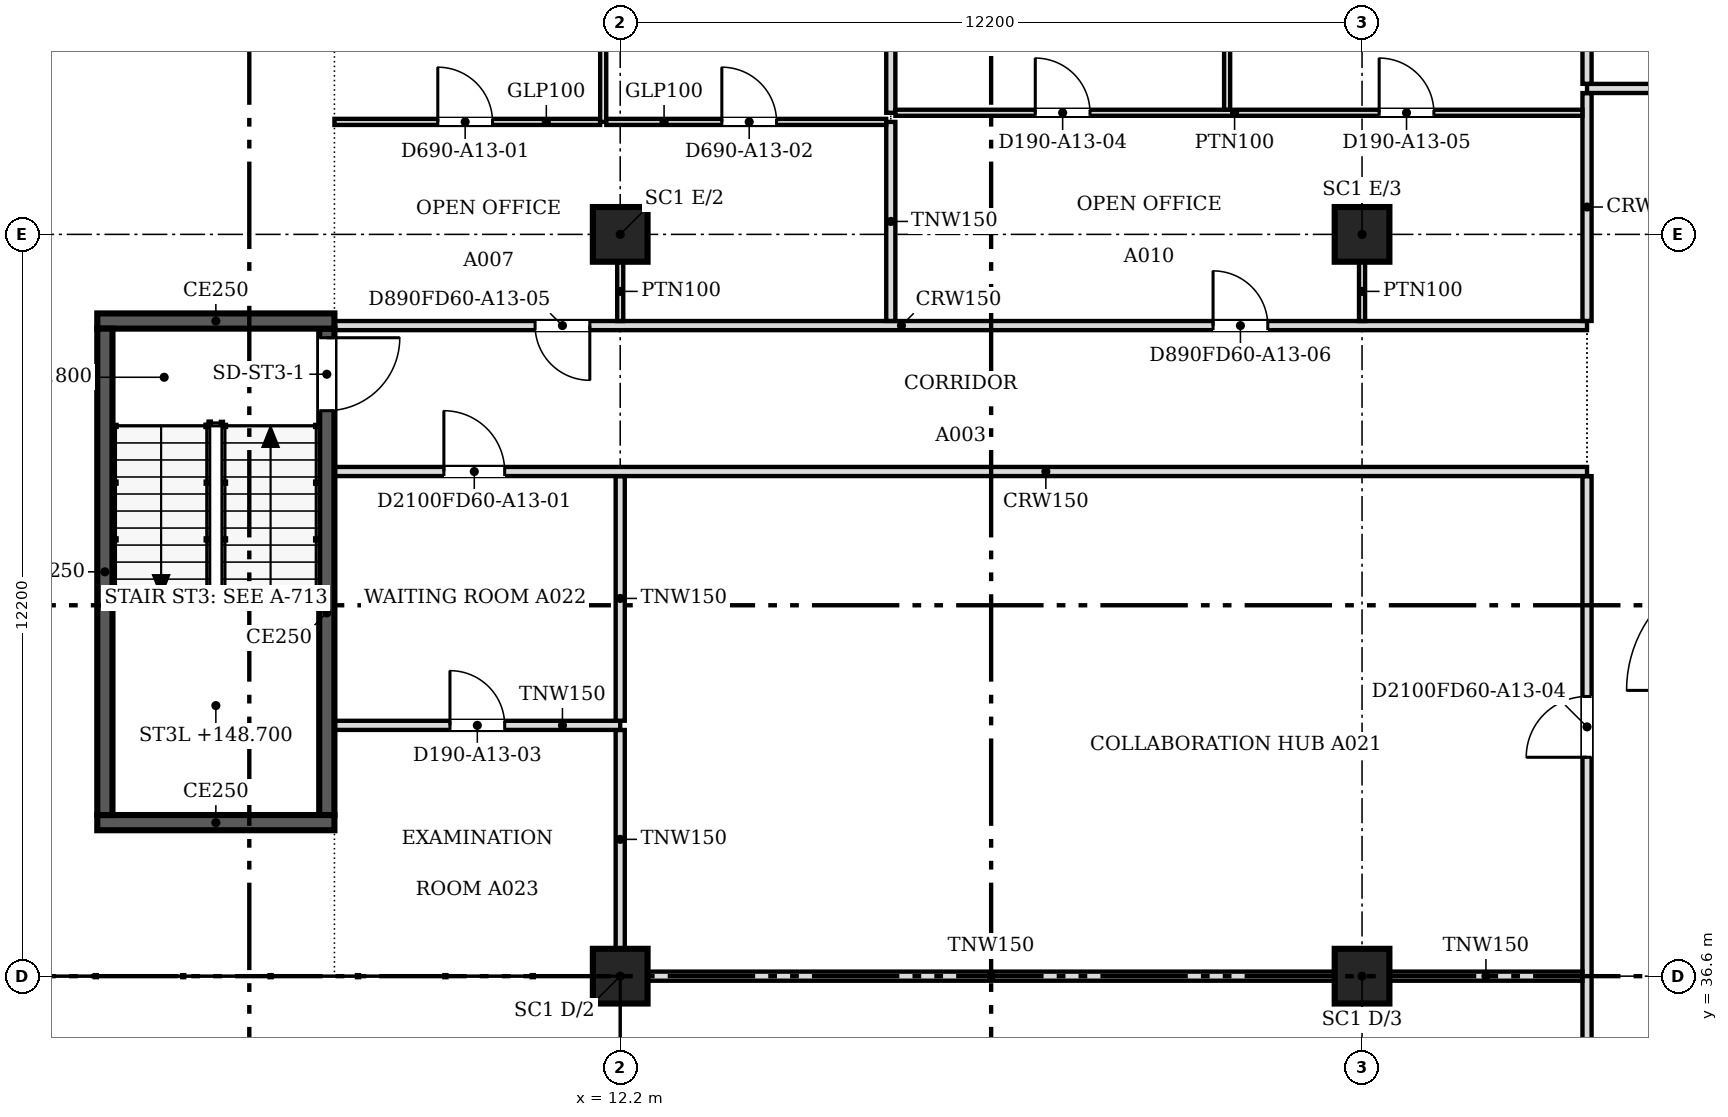
"""IFC4 building model, lengths in metres.
Left out: names, types, materials, properties, quantities, classifications, styles, units other than length and angle.
Written with IfcOpenShell. Run it as: python <this file> out.ifc"""

import sys

from ifc_helpers import new_model, si_unit, direction, frame, frame_2d, origin, origin_2d, place, context, subcontext, project, spatial, polyline, rectangle, outline, extrude, faceted_brep, source, transform, mapped, element, fill, save


model = new_model("IFC4")
c1 = context("Model", 3, precision=1e-05, world=origin(), true_north=direction((0.0, 1.0)))
c2 = subcontext(c1, "Body", "Model", "MODEL_VIEW")
j1 = project(units=[si_unit("LENGTHUNIT", "METRE"), si_unit("PLANEANGLEUNIT", "RADIAN")], contexts=[c1])
p1 = place(None, origin())
s1 = spatial("IfcSite", under=j1, at=p1, CompositionType="ELEMENT")
p2 = place(p1, origin())
s2 = spatial("IfcBuilding", under=s1, at=p2, CompositionType="ELEMENT")
p3 = place(p2, frame((0.0, 0.0, 146.8)))
s3 = spatial("IfcBuildingStorey", under=s2, at=p3, CompositionType="ELEMENT", Elevation=146.8)
for number, where, z_axis, x_axis in (
    (1, (12.2, 36.6, 0.0), (0.0, 0.0, 1.0), (1.0, 0.0, 0.0)),
    (2, (12.2, 48.8, 0.0), (0.0, 0.0, 1.0), (1.0, 0.0, 0.0)),
    (3, (24.4, 36.6, 0.0), (0.0, 0.0, 1.0), (1.0, 0.0, 0.0)),
    (4, (24.4, 48.8, 0.0), (0.0, 0.0, 1.0), (1.0, 0.0, 0.0)),
):
    element("IfcColumn", number, at=place(p3, frame(where, z_axis=z_axis, x_axis=x_axis)), inside=s3, PredefinedType="COLUMN", context=c2, shape_type="SweptSolid", body=[
        extrude(rectangle(XDim=0.9, YDim=0.9, at=origin_2d()), origin(), (0.0, 0.0, 1.0), 3.5),
    ])
m1 = source(origin(), c2, "Body", "Brep", [
    faceted_brep([(0.053, -0.25, 0.0), (2.997, -0.25, 3.8), (0.053, -0.25, 7.6), (0.0, -0.25, 7.532), (0.0, -0.25, 0.068), (0.106, 0.25, 7.532), (2.944, 0.25, 3.868), (2.944, 0.25, 3.732), (0.106, 0.25, 0.068), (2.997, 0.0, 3.8), (0.053, 0.0, 0.0), (0.053, 0.0, 7.6)], [[[0, 1, 2, 3, 4]], [[5, 6, 7, 8]], [[8, 7, 9, 1, 0, 10]], [[6, 5, 11, 2, 1, 9]], [[3, 2, 11]], [[10, 0, 4]], [[8, 10, 4, 3, 11, 5]], [[9, 7, 6]]]),
])
p4 = place(p3, frame((3.431, 53.625, -3.8), z_axis=(0.0, 0.0, 1.0), x_axis=(-0.707106781187, -0.707106781187, 0.0)))
e5 = element("IfcWall", 5, at=p4, inside=s3, PredefinedType="SOLIDWALL", context=c2, shape_type="MappedRepresentation", body=[
    mapped(m1, transform((0.0, 0.0, 0.0), scale=1.0)),
])
m2 = source(origin(), c2, "Body", "SweptSolid", [
    extrude(outline(polyline([(0.253, 0.666), (2.681, 3.8), (0.253, 6.934), (0.253, 0.666)])), frame((0.0, 0.26, 0.0), z_axis=(0.0, -1.0, 0.0), x_axis=(1.0, 0.0, 0.0)), (0.0, 0.0, 1.0), 0.52),
])
p5 = place(p4, origin())
e6 = element("IfcOpeningElement", 6, at=p5, cuts=e5, PredefinedType="OPENING", context=c2, shape_type="MappedRepresentation", body=[
    mapped(m2, transform((0.0, 0.0, 0.0), scale=1.0)),
])
m3 = source(origin(), c2, "Body", "Brep", [
    faceted_brep([(2.944, -0.25, 0.0), (2.997, -0.25, 0.068), (2.997, -0.25, 3.8), (0.0, -0.25, 3.8), (0.053, 0.25, 3.8), (2.891, 0.25, 3.8), (2.891, 0.25, 0.068), (0.053, 0.25, 3.732), (2.944, 0.0, 0.0), (0.0, 0.0, 3.8)], [[[0, 1, 2, 3]], [[4, 5, 6, 7]], [[1, 0, 8]], [[5, 4, 9, 3, 2]], [[7, 6, 8, 0, 3, 9]], [[7, 9, 4]], [[1, 8, 6, 5, 2]]]),
])
p6 = place(p3, frame((3.394, 53.588, 0.0), z_axis=(0.0, 0.0, 1.0), x_axis=(-0.707106781187, -0.707106781187, 0.0)))
e7 = element("IfcWall", 7, at=p6, inside=s3, PredefinedType="SOLIDWALL", context=c2, shape_type="MappedRepresentation", body=[
    mapped(m3, transform((0.0, 0.0, 0.0), scale=1.0)),
])
m4 = source(origin(), c2, "Body", "SweptSolid", [
    extrude(outline(polyline([(2.744, 3.55), (0.51, 3.55), (2.744, 0.666), (2.744, 3.55)])), frame((0.0, 0.26, 0.0), z_axis=(0.0, -1.0, 0.0), x_axis=(1.0, 0.0, 0.0)), (0.0, 0.0, 1.0), 0.52),
])
p7 = place(p6, origin())
e8 = element("IfcOpeningElement", 8, at=p7, cuts=e7, PredefinedType="OPENING", context=c2, shape_type="MappedRepresentation", body=[
    mapped(m4, transform((0.0, 0.0, 0.0), scale=1.0)),
])
p8 = place(p3, frame((7.5, 39.125, 0.0), z_axis=(0.0, 0.0, 1.0), x_axis=(-1.0, 0.0, 0.0)))
e9 = element("IfcWall", 9, at=p8, inside=s3, PredefinedType="SOLIDWALL", context=c2, shape_type="SweptSolid", body=[
    extrude(rectangle(XDim=3.9, YDim=0.25, at=frame_2d((1.95, 0.0))), origin(), (0.0, 0.0, 1.0), 3.8),
])
p9 = place(p3, frame((3.725, 39.25, 0.0), z_axis=(0.0, 0.0, 1.0), x_axis=(0.0, 1.0, 0.0)))
e10 = element("IfcWall", 10, at=p9, inside=s3, PredefinedType="SOLIDWALL", context=c2, shape_type="SweptSolid", body=[
    extrude(rectangle(XDim=8.0, YDim=0.25, at=frame_2d((4.0, 0.0))), origin(), (0.0, 0.0, 1.0), 3.8),
])
p10 = place(p3, frame((3.6, 47.375, 0.0), z_axis=(0.0, 0.0, 1.0), x_axis=(1.0, 0.0, 0.0)))
e11 = element("IfcWall", 11, at=p10, inside=s3, PredefinedType="SOLIDWALL", context=c2, shape_type="SweptSolid", body=[
    extrude(rectangle(XDim=3.9, YDim=0.25, at=frame_2d((1.95, 0.0))), origin(), (0.0, 0.0, 1.0), 3.8),
])
p11 = place(p3, frame((7.375, 47.25, 0.0), z_axis=(0.0, 0.0, 1.0), x_axis=(0.0, -1.0, 0.0)))
e12 = element("IfcWall", 12, at=p11, inside=s3, PredefinedType="SOLIDWALL", context=c2, shape_type="SweptSolid", body=[
    extrude(rectangle(XDim=8.0, YDim=0.25, at=frame_2d((4.0, 0.0))), origin(), (0.0, 0.0, 1.0), 3.8),
])
m5 = source(origin(), c2, "Body", "SweptSolid", [
    extrude(rectangle(XDim=1.2, YDim=2.1, at=frame_2d((0.6, 1.05))), frame((0.0, 0.135, 0.0), z_axis=(0.0, -1.0, 0.0), x_axis=(1.0, 0.0, 0.0)), (0.0, 0.0, 1.0), 0.27),
])
p12 = place(p11, frame((0.15, 0.0, 0.0)))
e13 = element("IfcOpeningElement", 13, at=p12, cuts=e12, PredefinedType="OPENING", context=c2, shape_type="MappedRepresentation", body=[
    mapped(m5, transform((0.0, 0.0, 0.0), scale=1.0)),
])
p13 = place(p3, frame((28.1, 18.8, 0.0), z_axis=(0.0, 0.0, 1.0), x_axis=(0.0, 1.0, 0.0)))
e14 = element("IfcWall", 14, at=p13, inside=s3, PredefinedType="PARTITIONING", context=c2, shape_type="SweptSolid", body=[
    extrude(rectangle(XDim=26.024, YDim=0.15, at=frame_2d((13.012, 0.0))), origin(), (0.0, 0.0, 1.0), 2.888),
])
m6 = source(origin(), c2, "Body", "SweptSolid", [
    extrude(rectangle(XDim=0.9, YDim=2.1, at=frame_2d((0.45, 1.05))), frame((0.0, 0.085, 0.0), z_axis=(0.0, -1.0, 0.0), x_axis=(1.0, 0.0, 0.0)), (0.0, 0.0, 1.0), 0.17),
])
p14 = place(p13, frame((1.1, 0.0, 0.0)))
e15 = element("IfcOpeningElement", 15, at=p14, cuts=e14, PredefinedType="OPENING", context=c2, shape_type="MappedRepresentation", body=[
    mapped(m6, transform((0.0, 0.0, 0.0), scale=1.0)),
])
m7 = source(origin(), c2, "Body", "SweptSolid", [
    extrude(rectangle(XDim=1.0, YDim=2.1, at=frame_2d((0.5, 1.05))), frame((0.0, 0.085, 0.0), z_axis=(0.0, -1.0, 0.0), x_axis=(1.0, 0.0, 0.0)), (0.0, 0.0, 1.0), 0.17),
])
p15 = place(p13, frame((14.201, 0.0, 0.0)))
e16 = element("IfcOpeningElement", 16, at=p15, cuts=e14, PredefinedType="OPENING", context=c2, shape_type="MappedRepresentation", body=[
    mapped(m7, transform((0.0, 0.0, 0.0), scale=1.0)),
])
p16 = place(p13, frame((8.2, 0.0, 0.0)))
e17 = element("IfcOpeningElement", 17, at=p16, cuts=e14, PredefinedType="OPENING", context=c2, shape_type="MappedRepresentation", body=[
    mapped(m6, transform((0.0, 0.0, 0.0), scale=1.0)),
])
p17 = place(p13, frame((21.4, 0.0, 0.0)))
e18 = element("IfcOpeningElement", 18, at=p17, cuts=e14, PredefinedType="OPENING", context=c2, shape_type="MappedRepresentation", body=[
    mapped(m7, transform((0.0, 0.0, 0.0), scale=1.0)),
])
p18 = place(p3, frame((12.651, 36.6, 0.0), z_axis=(0.0, 0.0, 1.0), x_axis=(1.0, 0.0, 0.0)))
e19 = element("IfcWall", 19, at=p18, inside=s3, PredefinedType="PARTITIONING", context=c2, shape_type="SweptSolid", body=[
    extrude(rectangle(XDim=11.298, YDim=0.15, at=frame_2d((5.649, 0.0))), origin(), (0.0, 0.0, 1.0), 2.888),
])
p19 = place(p3, frame((24.851, 36.6, 0.0), z_axis=(0.0, 0.0, 1.0), x_axis=(1.0, 0.0, 0.0)))
e20 = element("IfcWall", 20, at=p19, inside=s3, PredefinedType="PARTITIONING", context=c2, shape_type="SweptSolid", body=[
    extrude(rectangle(XDim=3.173, YDim=0.15, at=frame_2d((1.586, 0.0))), origin(), (0.0, 0.0, 1.0), 2.888),
])
p20 = place(p3, frame((12.2, 37.051, 0.0), z_axis=(0.0, 0.0, 1.0), x_axis=(0.0, 1.0, 0.0)))
e21 = element("IfcWall", 21, at=p20, inside=s3, PredefinedType="PARTITIONING", context=c2, shape_type="SweptSolid", body=[
    extrude(rectangle(XDim=3.598, YDim=0.15, at=frame_2d((1.799, 0.0))), origin(), (0.0, 0.0, 1.0), 2.888),
])
p21 = place(p3, frame((12.2, 40.725, 0.0), z_axis=(0.0, 0.0, 1.0), x_axis=(-1.0, 0.0, 0.0)))
e22 = element("IfcWall", 22, at=p21, inside=s3, PredefinedType="PARTITIONING", context=c2, shape_type="SweptSolid", body=[
    extrude(rectangle(XDim=4.7, YDim=0.15, at=frame_2d((2.35, 0.0))), origin(), (0.0, 0.0, 1.0), 2.888),
])
p22 = place(p21, frame((1.9, 0.0, 0.0)))
e23 = element("IfcOpeningElement", 23, at=p22, cuts=e22, PredefinedType="OPENING", context=c2, shape_type="MappedRepresentation", body=[
    mapped(m6, transform((0.0, 0.0, 0.0), scale=1.0)),
])
p23 = place(p3, frame((12.2, 40.801, 0.0), z_axis=(0.0, 0.0, 1.0), x_axis=(0.0, 1.0, 0.0)))
e24 = element("IfcWall", 24, at=p23, inside=s3, PredefinedType="PARTITIONING", context=c2, shape_type="SweptSolid", body=[
    extrude(rectangle(XDim=4.023, YDim=0.15, at=frame_2d((2.011, 0.0))), origin(), (0.0, 0.0, 1.0), 2.888),
])
p24 = place(p3, frame((28.1, 44.9, 0.0), z_axis=(0.0, 0.0, 1.0), x_axis=(-1.0, 0.0, 0.0)))
e25 = element("IfcWall", 25, at=p24, inside=s3, PredefinedType="PARTITIONING", context=c2, shape_type="SweptSolid", body=[
    extrude(rectangle(XDim=20.6, YDim=0.15, at=frame_2d((10.3, 0.0))), origin(), (0.0, 0.0, 1.0), 2.888),
])
p25 = place(p24, frame((17.8, 0.0, 0.0)))
e26 = element("IfcOpeningElement", 26, at=p25, cuts=e25, PredefinedType="OPENING", context=c2, shape_type="MappedRepresentation", body=[
    mapped(m7, transform((0.0, 0.0, 0.0), scale=1.0)),
])
p26 = place(p3, frame((7.5, 47.3, 0.0), z_axis=(0.0, 0.0, 1.0), x_axis=(1.0, 0.0, 0.0)))
e27 = element("IfcWall", 27, at=p26, inside=s3, PredefinedType="PARTITIONING", context=c2, shape_type="SweptSolid", body=[
    extrude(rectangle(XDim=20.6, YDim=0.15, at=frame_2d((10.3, 0.0))), origin(), (0.0, 0.0, 1.0), 2.888),
])
p27 = place(p26, frame((3.3, 0.0, 0.0)))
e28 = element("IfcOpeningElement", 28, at=p27, cuts=e27, PredefinedType="OPENING", context=c2, shape_type="MappedRepresentation", body=[
    mapped(m6, transform((0.0, 0.0, 0.0), scale=1.0)),
])
p28 = place(p26, frame((14.45, 0.0, 0.0)))
e29 = element("IfcOpeningElement", 29, at=p28, cuts=e27, PredefinedType="OPENING", context=c2, shape_type="MappedRepresentation", body=[
    mapped(m6, transform((0.0, 0.0, 0.0), scale=1.0)),
])
p29 = place(p3, frame((16.65, 47.376, 0.0), z_axis=(0.0, 0.0, 1.0), x_axis=(0.0, 1.0, 0.0)))
e30 = element("IfcWall", 30, at=p29, inside=s3, PredefinedType="PARTITIONING", context=c2, shape_type="SweptSolid", body=[
    extrude(rectangle(XDim=3.274, YDim=0.15, at=frame_2d((1.637, 0.0))), origin(), (0.0, 0.0, 1.0), 2.888),
])
p30 = place(p3, frame((28.1, 47.376, 0.0), z_axis=(0.0, 0.0, 1.0), x_axis=(0.0, 1.0, 0.0)))
e31 = element("IfcWall", 31, at=p30, inside=s3, PredefinedType="PARTITIONING", context=c2, shape_type="SweptSolid", body=[
    extrude(rectangle(XDim=3.748, YDim=0.15, at=frame_2d((1.874, 0.0))), origin(), (0.0, 0.0, 1.0), 2.888),
])
for number, where, z_axis, x_axis in (
    (32, (12.2, 48.35, 0.0), (0.0, 0.0, 1.0), (0.0, -1.0, 0.0)),
    (33, (24.4, 48.35, 0.0), (0.0, 0.0, 1.0), (0.0, -1.0, 0.0)),
):
    element("IfcWall", number, at=place(p3, frame(where, z_axis=z_axis, x_axis=x_axis)), inside=s3, PredefinedType="PARTITIONING", context=c2, shape_type="SweptSolid", body=[
        extrude(rectangle(XDim=0.975, YDim=0.1, at=frame_2d((0.488, 0.0))), origin(), (0.0, 0.0, 1.0), 2.888),
    ])
p31 = place(p3, frame((7.5, 50.65, 0.0), z_axis=(0.0, 0.0, 1.0), x_axis=(1.0, 0.0, 0.0)))
e34 = element("IfcWall", 34, at=p31, inside=s3, PredefinedType="PARTITIONING", context=c2, shape_type="SweptSolid", body=[
    extrude(rectangle(XDim=4.369, YDim=0.1, at=frame_2d((2.185, 0.0))), origin(), (0.0, 0.0, 1.0), 2.888),
])
m8 = source(origin(), c2, "Body", "SweptSolid", [
    extrude(rectangle(XDim=0.9, YDim=2.1, at=frame_2d((0.45, 1.05))), frame((0.0, 0.06, 0.0), z_axis=(0.0, -1.0, 0.0), x_axis=(1.0, 0.0, 0.0)), (0.0, 0.0, 1.0), 0.12),
])
p32 = place(p31, frame((1.7, 0.0, 0.0)))
e35 = element("IfcOpeningElement", 35, at=p32, cuts=e34, PredefinedType="OPENING", context=c2, shape_type="MappedRepresentation", body=[
    mapped(m8, transform((0.0, 0.0, 0.0), scale=1.0)),
])
p33 = place(p3, frame((11.92, 50.65, 0.0), z_axis=(0.0, 0.0, 1.0), x_axis=(0.0, 1.0, 0.0)))
e36 = element("IfcWall", 36, at=p33, inside=s3, PredefinedType="PARTITIONING", context=c2, shape_type="SweptSolid", body=[
    extrude(rectangle(XDim=3.75, YDim=0.1, at=frame_2d((1.875, 0.0))), origin(), (0.0, 0.0, 1.0), 2.888),
])
p34 = place(p3, frame((11.971, 50.65, 0.0), z_axis=(0.0, 0.0, 1.0), x_axis=(1.0, 0.0, 0.0)))
e37 = element("IfcWall", 37, at=p34, inside=s3, PredefinedType="PARTITIONING", context=c2, shape_type="SweptSolid", body=[
    extrude(rectangle(XDim=4.603, YDim=0.1, at=frame_2d((2.301, 0.0))), origin(), (0.0, 0.0, 1.0), 2.888),
])
p35 = place(p34, frame((1.9, 0.0, 0.0)))
e38 = element("IfcOpeningElement", 38, at=p35, cuts=e37, PredefinedType="OPENING", context=c2, shape_type="MappedRepresentation", body=[
    mapped(m8, transform((0.0, 0.0, 0.0), scale=1.0)),
])
p36 = place(p3, frame((16.65, 50.8, 0.0), z_axis=(0.0, 0.0, 1.0), x_axis=(0.0, 1.0, 0.0)))
e39 = element("IfcWall", 39, at=p36, inside=s3, PredefinedType="PARTITIONING", context=c2, shape_type="SweptSolid", body=[
    extrude(rectangle(XDim=3.6, YDim=0.15, at=frame_2d((1.8, 0.0))), origin(), (0.0, 0.0, 1.0), 2.888),
])
p37 = place(p3, frame((16.726, 50.8, 0.0), z_axis=(0.0, 0.0, 1.0), x_axis=(1.0, 0.0, 0.0)))
e40 = element("IfcWall", 40, at=p37, inside=s3, PredefinedType="PARTITIONING", context=c2, shape_type="SweptSolid", body=[
    extrude(rectangle(XDim=11.298, YDim=0.1, at=frame_2d((5.649, 0.0))), origin(), (0.0, 0.0, 1.0), 2.888),
])
p38 = place(p37, frame((2.3, 0.0, 0.0)))
e41 = element("IfcOpeningElement", 41, at=p38, cuts=e40, PredefinedType="OPENING", context=c2, shape_type="MappedRepresentation", body=[
    mapped(m8, transform((0.0, 0.0, 0.0), scale=1.0)),
])
p39 = place(p37, frame((7.955, 0.0, 0.0)))
e42 = element("IfcOpeningElement", 42, at=p39, cuts=e40, PredefinedType="OPENING", context=c2, shape_type="MappedRepresentation", body=[
    mapped(m8, transform((0.0, 0.0, 0.0), scale=1.0)),
])
p40 = place(p3, frame((22.181, 50.851, 0.0), z_axis=(0.0, 0.0, 1.0), x_axis=(0.0, 1.0, 0.0)))
e43 = element("IfcWall", 43, at=p40, inside=s3, PredefinedType="PARTITIONING", context=c2, shape_type="SweptSolid", body=[
    extrude(rectangle(XDim=3.549, YDim=0.1, at=frame_2d((1.774, 0.0))), origin(), (0.0, 0.0, 1.0), 2.888),
])
p41 = place(p3, frame((28.1, 51.2, 0.0), z_axis=(0.0, 0.0, 1.0), x_axis=(1.0, 0.0, 0.0)))
e44 = element("IfcWall", 44, at=p41, inside=s3, PredefinedType="PARTITIONING", context=c2, shape_type="SweptSolid", body=[
    extrude(rectangle(XDim=31.438, YDim=0.15, at=frame_2d((15.719, 0.0))), origin(), (0.0, 0.0, 1.0), 2.888),
])
p42 = place(p41, frame((7.0, 0.0, 0.0)))
e45 = element("IfcOpeningElement", 45, at=p42, cuts=e44, PredefinedType="OPENING", context=c2, shape_type="MappedRepresentation", body=[
    mapped(m6, transform((0.0, 0.0, 0.0), scale=1.0)),
])
p43 = place(p41, frame((22.8, 0.0, 0.0)))
e46 = element("IfcOpeningElement", 46, at=p43, cuts=e44, PredefinedType="OPENING", context=c2, shape_type="MappedRepresentation", body=[
    mapped(m6, transform((0.0, 0.0, 0.0), scale=1.0)),
])
p44 = place(p3, frame((28.1, 51.276, 0.0), z_axis=(0.0, 0.0, 1.0), x_axis=(0.0, 1.0, 0.0)))
e47 = element("IfcWall", 47, at=p44, inside=s3, PredefinedType="PARTITIONING", context=c2, shape_type="SweptSolid", body=[
    extrude(rectangle(XDim=3.124, YDim=0.15, at=frame_2d((1.562, 0.0))), origin(), (0.0, 0.0, 1.0), 2.888),
])
m9 = source(origin(), c2, "Body", "SweptSolid", [
    extrude(rectangle(XDim=1.2, YDim=2.1, at=frame_2d((0.6, 1.05))), frame((0.0, 0.025, 0.0), z_axis=(0.0, -1.0, 0.0), x_axis=(1.0, 0.0, 0.0)), (0.0, 0.0, 1.0), 0.05),
])
p45 = place(p12, origin())
e48 = element("IfcDoor", 48, at=p45, inside=s3, OperationType="SINGLE_SWING_LEFT", PredefinedType="DOOR", context=c2, shape_type="MappedRepresentation", body=[
    mapped(m9, transform((0.0, 0.0, 0.0), scale=1.0)),
])
fill(e13, e48)
m10 = source(origin(), c2, "Body", "SweptSolid", [
    extrude(rectangle(XDim=0.9, YDim=2.1, at=frame_2d((0.45, 1.05))), frame((0.0, 0.025, 0.0), z_axis=(0.0, -1.0, 0.0), x_axis=(1.0, 0.0, 0.0)), (0.0, 0.0, 1.0), 0.05),
])
p46 = place(p32, origin())
e49 = element("IfcDoor", 49, at=p46, inside=s3, OperationType="SINGLE_SWING_LEFT", PredefinedType="DOOR", context=c2, shape_type="MappedRepresentation", body=[
    mapped(m10, transform((0.0, 0.0, 0.0), scale=1.0)),
])
fill(e35, e49)
p47 = place(p35, origin())
e50 = element("IfcDoor", 50, at=p47, inside=s3, OperationType="SINGLE_SWING_LEFT", PredefinedType="DOOR", context=c2, shape_type="MappedRepresentation", body=[
    mapped(m10, transform((0.0, 0.0, 0.0), scale=1.0)),
])
fill(e38, e50)
m11 = source(origin(), c2, "Body", "SweptSolid", [
    extrude(rectangle(XDim=1.0, YDim=2.1, at=frame_2d((0.5, 1.05))), frame((0.0, 0.025, 0.0), z_axis=(0.0, -1.0, 0.0), x_axis=(1.0, 0.0, 0.0)), (0.0, 0.0, 1.0), 0.05),
])
p48 = place(p25, origin())
e51 = element("IfcDoor", 51, at=p48, inside=s3, OperationType="SINGLE_SWING_RIGHT", PredefinedType="DOOR", context=c2, shape_type="MappedRepresentation", body=[
    mapped(m11, transform((0.0, 0.0, 0.0), scale=1.0)),
])
fill(e26, e51)
p49 = place(p22, origin())
e52 = element("IfcDoor", 52, at=p49, inside=s3, OperationType="SINGLE_SWING_RIGHT", PredefinedType="DOOR", context=c2, shape_type="MappedRepresentation", body=[
    mapped(m10, transform((0.0, 0.0, 0.0), scale=1.0)),
])
fill(e23, e52)
p50 = place(p38, origin())
e53 = element("IfcDoor", 53, at=p50, inside=s3, OperationType="SINGLE_SWING_LEFT", PredefinedType="DOOR", context=c2, shape_type="MappedRepresentation", body=[
    mapped(m10, transform((0.0, 0.0, 0.0), scale=1.0)),
])
fill(e41, e53)
p51 = place(p39, origin())
e54 = element("IfcDoor", 54, at=p51, inside=s3, OperationType="SINGLE_SWING_LEFT", PredefinedType="DOOR", context=c2, shape_type="MappedRepresentation", body=[
    mapped(m10, transform((0.0, 0.0, 0.0), scale=1.0)),
])
fill(e42, e54)
p52 = place(p17, origin())
e55 = element("IfcDoor", 55, at=p52, inside=s3, OperationType="SINGLE_SWING_LEFT", PredefinedType="DOOR", context=c2, shape_type="MappedRepresentation", body=[
    mapped(m11, transform((0.0, 0.0, 0.0), scale=1.0)),
])
fill(e18, e55)
p53 = place(p27, origin())
e56 = element("IfcDoor", 56, at=p53, inside=s3, OperationType="SINGLE_SWING_RIGHT", PredefinedType="DOOR", context=c2, shape_type="MappedRepresentation", body=[
    mapped(m10, transform((0.0, 0.0, 0.0), scale=1.0)),
])
fill(e28, e56)
p54 = place(p28, origin())
e57 = element("IfcDoor", 57, at=p54, inside=s3, OperationType="SINGLE_SWING_LEFT", PredefinedType="DOOR", context=c2, shape_type="MappedRepresentation", body=[
    mapped(m10, transform((0.0, 0.0, 0.0), scale=1.0)),
])
fill(e29, e57)
save(model, sys.argv[1])
